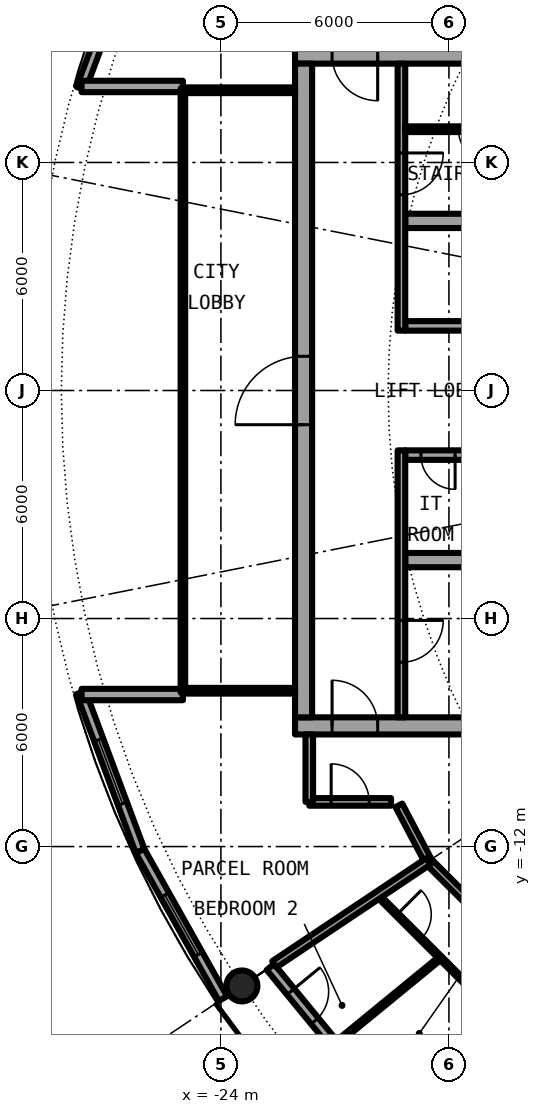
"""IFC4 building model, lengths in metres.
Left out: names, types, materials, properties, quantities, classifications, styles, units other than length and angle.
Written with IfcOpenShell. Run it as: python <this file> out.ifc"""

import sys

from ifc_helpers import new_model, si_unit, direction, frame, frame_2d, origin, origin_2d, place, context, subcontext, project, spatial, rectangle, hollow_circle, extrude, element, fill, save


model = new_model("IFC4")
c1 = context("Model", 3, precision=1e-05, world=origin(), true_north=direction((0.0, 1.0)))
c2 = subcontext(c1, "Body", "Model", "MODEL_VIEW")
j1 = project(units=[si_unit("LENGTHUNIT", "METRE"), si_unit("PLANEANGLEUNIT", "RADIAN")], contexts=[c1])
p1 = place(None, origin())
s1 = spatial("IfcSite", under=j1, at=p1, CompositionType="ELEMENT")
p2 = place(p1, origin())
s2 = spatial("IfcBuilding", under=s1, at=p2, CompositionType="ELEMENT")
p3 = place(p2, frame((0.0, 0.0, 212.7)))
s3 = spatial("IfcBuildingStorey", under=s2, at=p3, CompositionType="ELEMENT", Elevation=212.7)
p4 = place(p3, frame((-23.448, -15.667, 0.0), z_axis=(0.0, 0.0, 1.0), x_axis=(1.0, 0.0, 0.0)))
e1 = element("IfcColumn", 1, at=p4, inside=s3, PredefinedType="COLUMN", context=c2, shape_type="SweptSolid", body=[
    extrude(hollow_circle(Radius=0.406, WallThickness=0.03, at=origin_2d()), origin(), (0.0, 0.0, 1.0), 3.05),
])
p5 = place(p3, frame((-22.699, -15.167, 0.0), z_axis=(0.0, 0.0, 1.0), x_axis=(0.634382322723, -0.773019449054, 0.0)))
e2 = element("IfcWall", 2, at=p5, inside=s3, PredefinedType="SOLIDWALL", context=c2, shape_type="SweptSolid", body=[
    extrude(rectangle(XDim=5.352, YDim=0.25, at=frame_2d((2.676, 0.0))), origin(), (0.0, 0.0, 1.0), 2.7),
])
p6 = place(p5, frame((0.841, 0.0, 0.0)))
e3 = element("IfcOpeningElement", 3, at=p6, cuts=e2, PredefinedType="OPENING", context=c2, shape_type="SweptSolid", body=[
    extrude(rectangle(XDim=1.0, YDim=2.2, at=frame_2d((0.5, 1.1))), frame((0.0, 0.135, 0.0), z_axis=(0.0, -1.0, 0.0), x_axis=(1.0, 0.0, 0.0)), (0.0, 0.0, 1.0), 0.27),
])
p7 = place(p5, frame((3.111, 0.0, 0.3)))
e4 = element("IfcOpeningElement", 4, at=p7, cuts=e2, PredefinedType="OPENING", context=c2, shape_type="SweptSolid", body=[
    extrude(rectangle(XDim=1.8, YDim=2.1, at=frame_2d((0.9, 1.05))), frame((0.0, 0.135, 0.0), z_axis=(0.0, -1.0, 0.0), x_axis=(1.0, 0.0, 0.0)), (0.0, 0.0, 1.0), 0.27),
])
p8 = place(p3, frame((-27.682, -7.945, 0.0), z_axis=(0.0, 0.0, 1.0), x_axis=(0.349247811493, -0.937030397675, 0.0)))
e5 = element("IfcWall", 5, at=p8, inside=s3, PredefinedType="SOLIDWALL", context=c2, shape_type="SweptSolid", body=[
    extrude(rectangle(XDim=4.452, YDim=0.25, at=frame_2d((2.226, 0.0))), origin(), (0.0, 0.0, 1.0), 2.7),
])
p9 = place(p8, frame((1.327, 0.0, 0.3)))
e6 = element("IfcOpeningElement", 6, at=p9, cuts=e5, PredefinedType="OPENING", context=c2, shape_type="SweptSolid", body=[
    extrude(rectangle(XDim=1.8, YDim=2.1, at=frame_2d((0.9, 1.05))), frame((0.0, 0.135, 0.0), z_axis=(0.0, -1.0, 0.0), x_axis=(1.0, 0.0, 0.0)), (0.0, 0.0, 1.0), 0.27),
])
p10 = place(p3, frame((-26.127, -12.117, 0.0), z_axis=(0.0, 0.0, 1.0), x_axis=(0.489696356642, -0.871893042919, 0.0)))
e7 = element("IfcWall", 7, at=p10, inside=s3, PredefinedType="SOLIDWALL", context=c2, shape_type="SweptSolid", body=[
    extrude(rectangle(XDim=4.454, YDim=0.25, at=frame_2d((2.227, 0.0))), origin(), (0.0, 0.0, 1.0), 2.7),
])
p11 = place(p10, frame((1.327, 0.0, 0.3)))
e8 = element("IfcOpeningElement", 8, at=p11, cuts=e7, PredefinedType="OPENING", context=c2, shape_type="SweptSolid", body=[
    extrude(rectangle(XDim=1.8, YDim=2.1, at=frame_2d((0.9, 1.05))), frame((0.0, 0.135, 0.0), z_axis=(0.0, -1.0, 0.0), x_axis=(1.0, 0.0, 0.0)), (0.0, 0.0, 1.0), 0.27),
])
p12 = place(p3, frame((-26.127, 12.117, 0.0), z_axis=(0.0, 0.0, 1.0), x_axis=(-0.349247811493, -0.937030397675, 0.0)))
e9 = element("IfcWall", 9, at=p12, inside=s3, PredefinedType="SOLIDWALL", context=c2, shape_type="SweptSolid", body=[
    extrude(rectangle(XDim=4.452, YDim=0.25, at=frame_2d((2.226, 0.0))), origin(), (0.0, 0.0, 1.0), 2.7),
])
p13 = place(p12, frame((1.327, 0.0, 0.3)))
e10 = element("IfcOpeningElement", 10, at=p13, cuts=e9, PredefinedType="OPENING", context=c2, shape_type="SweptSolid", body=[
    extrude(rectangle(XDim=1.8, YDim=2.1, at=frame_2d((0.9, 1.05))), frame((0.0, 0.135, 0.0), z_axis=(0.0, -1.0, 0.0), x_axis=(1.0, 0.0, 0.0)), (0.0, 0.0, 1.0), 0.27),
])
for number, where, z_axis, x_axis in (
    (11, (-25.0, 8.0, 0.0), (0.0, 0.0, 1.0), (-1.0, 0.0, 0.0)),
    (12, (-25.0, -8.0, 0.0), (0.0, 0.0, 1.0), (-1.0, 0.0, 0.0)),
):
    element("IfcWall", number, at=place(p3, frame(where, z_axis=z_axis, x_axis=x_axis)), inside=s3, PredefinedType="SOLIDWALL", context=c2, shape_type="SweptSolid", body=[
        extrude(rectangle(XDim=2.667, YDim=0.3, at=frame_2d((1.333, 0.0))), origin(), (0.0, 0.0, 1.0), 2.7),
    ])
p14 = place(p3, frame((-22.05, -8.825, 0.0), z_axis=(0.0, 0.0, 1.0), x_axis=(1.0, 0.0, 0.0)))
e13 = element("IfcWall", 13, at=p14, inside=s3, PredefinedType="SHEAR", context=c2, shape_type="SweptSolid", body=[
    extrude(rectangle(XDim=13.5, YDim=0.45, at=frame_2d((6.75, 0.0))), origin(), (0.0, 0.0, 1.0), 3.05),
])
p15 = place(p14, frame((0.975, 0.0, 0.0)))
e14 = element("IfcOpeningElement", 14, at=p15, cuts=e13, PredefinedType="OPENING", context=c2, shape_type="SweptSolid", body=[
    extrude(rectangle(XDim=1.2, YDim=2.3, at=frame_2d((0.6, 1.15))), frame((0.0, 0.235, 0.0), z_axis=(0.0, -1.0, 0.0), x_axis=(1.0, 0.0, 0.0)), (0.0, 0.0, 1.0), 0.47),
])
p16 = place(p3, frame((-8.55, 8.825, 0.0), z_axis=(0.0, 0.0, 1.0), x_axis=(-1.0, 0.0, 0.0)))
e15 = element("IfcWall", 15, at=p16, inside=s3, PredefinedType="SHEAR", context=c2, shape_type="SweptSolid", body=[
    extrude(rectangle(XDim=13.5, YDim=0.45, at=frame_2d((6.75, 0.0))), origin(), (0.0, 0.0, 1.0), 3.05),
])
p17 = place(p16, frame((11.325, 0.0, 0.0)))
e16 = element("IfcOpeningElement", 16, at=p17, cuts=e15, PredefinedType="OPENING", context=c2, shape_type="SweptSolid", body=[
    extrude(rectangle(XDim=1.2, YDim=2.3, at=frame_2d((0.6, 1.15))), frame((0.0, 0.235, 0.0), z_axis=(0.0, -1.0, 0.0), x_axis=(1.0, 0.0, 0.0)), (0.0, 0.0, 1.0), 0.47),
])
p18 = place(p3, frame((-21.825, -8.6, 0.0), z_axis=(0.0, 0.0, 1.0), x_axis=(0.0, 1.0, 0.0)))
e17 = element("IfcWall", 17, at=p18, inside=s3, PredefinedType="SHEAR", context=c2, shape_type="SweptSolid", body=[
    extrude(rectangle(XDim=17.2, YDim=0.45, at=frame_2d((8.6, 0.0))), origin(), (0.0, 0.0, 1.0), 3.05),
])
p19 = place(p18, frame((7.7, 0.0, 0.0)))
e18 = element("IfcOpeningElement", 18, at=p19, cuts=e17, PredefinedType="OPENING", context=c2, shape_type="SweptSolid", body=[
    extrude(rectangle(XDim=1.8, YDim=2.3, at=frame_2d((0.9, 1.15))), frame((0.0, 0.235, 0.0), z_axis=(0.0, -1.0, 0.0), x_axis=(1.0, 0.0, 0.0)), (0.0, 0.0, 1.0), 0.47),
])
p20 = place(p3, frame((-9.0, -1.7, 0.0), z_axis=(0.0, 0.0, 1.0), x_axis=(-1.0, 0.0, 0.0)))
e19 = element("IfcWall", 19, at=p20, inside=s3, PredefinedType="SHEAR", context=c2, shape_type="SweptSolid", body=[
    extrude(rectangle(XDim=10.15, YDim=0.25, at=frame_2d((5.075, 0.0))), origin(), (0.0, 0.0, 1.0), 3.05),
])
p21 = place(p20, frame((0.762, 0.0, 0.0)))
e20 = element("IfcOpeningElement", 20, at=p21, cuts=e19, PredefinedType="OPENING", context=c2, shape_type="SweptSolid", body=[
    extrude(rectangle(XDim=0.9, YDim=2.3, at=frame_2d((0.45, 1.15))), frame((0.0, 0.135, 0.0), z_axis=(0.0, -1.0, 0.0), x_axis=(1.0, 0.0, 0.0)), (0.0, 0.0, 1.0), 0.27),
])
p22 = place(p20, frame((3.775, 0.0, 0.0)))
e21 = element("IfcOpeningElement", 21, at=p22, cuts=e19, PredefinedType="OPENING", context=c2, shape_type="SweptSolid", body=[
    extrude(rectangle(XDim=0.9, YDim=2.3, at=frame_2d((0.45, 1.15))), frame((0.0, 0.135, 0.0), z_axis=(0.0, -1.0, 0.0), x_axis=(1.0, 0.0, 0.0)), (0.0, 0.0, 1.0), 0.27),
])
p23 = place(p20, frame((8.837, 0.0, 0.0)))
e22 = element("IfcOpeningElement", 22, at=p23, cuts=e19, PredefinedType="OPENING", context=c2, shape_type="SweptSolid", body=[
    extrude(rectangle(XDim=0.9, YDim=2.3, at=frame_2d((0.45, 1.15))), frame((0.0, 0.135, 0.0), z_axis=(0.0, -1.0, 0.0), x_axis=(1.0, 0.0, 0.0)), (0.0, 0.0, 1.0), 0.27),
])
p24 = place(p3, frame((-9.0, -4.462, 0.0), z_axis=(0.0, 0.0, 1.0), x_axis=(-1.0, 0.0, 0.0)))
e23 = element("IfcWall", 23, at=p24, inside=s3, PredefinedType="SHEAR", context=c2, shape_type="SweptSolid", body=[
    extrude(rectangle(XDim=10.15, YDim=0.375, at=frame_2d((5.075, 0.0))), origin(), (0.0, 0.0, 1.0), 3.05),
])
p25 = place(p24, frame((6.6, 0.0, 0.0)))
e24 = element("IfcOpeningElement", 24, at=p25, cuts=e23, PredefinedType="OPENING", context=c2, shape_type="SweptSolid", body=[
    extrude(rectangle(XDim=1.1, YDim=2.3, at=frame_2d((0.55, 1.15))), frame((0.0, 0.198, 0.0), z_axis=(0.0, -1.0, 0.0), x_axis=(1.0, 0.0, 0.0)), (0.0, 0.0, 1.0), 0.395),
])
p26 = place(p3, frame((-19.25, -1.575, 0.0), z_axis=(0.0, 0.0, 1.0), x_axis=(0.0, -1.0, 0.0)))
e25 = element("IfcWall", 25, at=p26, inside=s3, PredefinedType="SOLIDWALL", context=c2, shape_type="SweptSolid", body=[
    extrude(rectangle(XDim=7.025, YDim=0.2, at=frame_2d((3.513, 0.0))), origin(), (0.0, 0.0, 1.0), 2.7),
])
p27 = place(p26, frame((4.475, 0.0, 0.0)))
e26 = element("IfcOpeningElement", 26, at=p27, cuts=e25, PredefinedType="OPENING", context=c2, shape_type="SweptSolid", body=[
    extrude(rectangle(XDim=1.1, YDim=2.3, at=frame_2d((0.55, 1.15))), frame((0.0, 0.11, 0.0), z_axis=(0.0, -1.0, 0.0), x_axis=(1.0, 0.0, 0.0)), (0.0, 0.0, 1.0), 0.22),
])
p28 = place(p3, frame((-9.0, 1.7, 0.0), z_axis=(0.0, 0.0, 1.0), x_axis=(-1.0, 0.0, 0.0)))
e27 = element("IfcWall", 27, at=p28, inside=s3, PredefinedType="SHEAR", context=c2, shape_type="SweptSolid", body=[
    extrude(rectangle(XDim=10.15, YDim=0.25, at=frame_2d((5.075, 0.0))), origin(), (0.0, 0.0, 1.0), 3.05),
])
p29 = place(p28, frame((0.387, 0.0, 0.0)))
e28 = element("IfcOpeningElement", 28, at=p29, cuts=e27, PredefinedType="OPENING", context=c2, shape_type="SweptSolid", body=[
    extrude(rectangle(XDim=1.1, YDim=2.3, at=frame_2d((0.55, 1.15))), frame((0.0, 0.135, 0.0), z_axis=(0.0, -1.0, 0.0), x_axis=(1.0, 0.0, 0.0)), (0.0, 0.0, 1.0), 0.27),
])
p30 = place(p28, frame((2.45, 0.0, 0.0)))
e29 = element("IfcOpeningElement", 29, at=p30, cuts=e27, PredefinedType="OPENING", context=c2, shape_type="SweptSolid", body=[
    extrude(rectangle(XDim=1.1, YDim=2.3, at=frame_2d((0.55, 1.15))), frame((0.0, 0.135, 0.0), z_axis=(0.0, -1.0, 0.0), x_axis=(1.0, 0.0, 0.0)), (0.0, 0.0, 1.0), 0.27),
])
p31 = place(p28, frame((4.45, 0.0, 0.0)))
e30 = element("IfcOpeningElement", 30, at=p31, cuts=e27, PredefinedType="OPENING", context=c2, shape_type="SweptSolid", body=[
    extrude(rectangle(XDim=1.1, YDim=2.3, at=frame_2d((0.55, 1.15))), frame((0.0, 0.135, 0.0), z_axis=(0.0, -1.0, 0.0), x_axis=(1.0, 0.0, 0.0)), (0.0, 0.0, 1.0), 0.27),
])
p32 = place(p28, frame((6.6, 0.0, 0.0)))
e31 = element("IfcOpeningElement", 31, at=p32, cuts=e27, PredefinedType="OPENING", context=c2, shape_type="SweptSolid", body=[
    extrude(rectangle(XDim=1.1, YDim=2.3, at=frame_2d((0.55, 1.15))), frame((0.0, 0.135, 0.0), z_axis=(0.0, -1.0, 0.0), x_axis=(1.0, 0.0, 0.0)), (0.0, 0.0, 1.0), 0.27),
])
p33 = place(p3, frame((-9.0, 4.462, 0.0), z_axis=(0.0, 0.0, 1.0), x_axis=(-1.0, 0.0, 0.0)))
e32 = element("IfcWall", 32, at=p33, inside=s3, PredefinedType="SHEAR", context=c2, shape_type="SweptSolid", body=[
    extrude(rectangle(XDim=10.15, YDim=0.375, at=frame_2d((5.075, 0.0))), origin(), (0.0, 0.0, 1.0), 3.05),
])
p34 = place(p3, frame((-19.25, 8.6, 0.0), z_axis=(0.0, 0.0, 1.0), x_axis=(0.0, -1.0, 0.0)))
e33 = element("IfcWall", 33, at=p34, inside=s3, PredefinedType="SOLIDWALL", context=c2, shape_type="SweptSolid", body=[
    extrude(rectangle(XDim=7.025, YDim=0.2, at=frame_2d((3.513, 0.0))), origin(), (0.0, 0.0, 1.0), 2.7),
])
p35 = place(p34, frame((2.35, 0.0, 0.0)))
e34 = element("IfcOpeningElement", 34, at=p35, cuts=e33, PredefinedType="OPENING", context=c2, shape_type="SweptSolid", body=[
    extrude(rectangle(XDim=1.1, YDim=2.3, at=frame_2d((0.55, 1.15))), frame((0.0, 0.11, 0.0), z_axis=(0.0, -1.0, 0.0), x_axis=(1.0, 0.0, 0.0)), (0.0, 0.0, 1.0), 0.22),
])
p36 = place(p3, frame((-15.45, 6.875, 0.0), z_axis=(0.0, 0.0, 1.0), x_axis=(-1.0, 0.0, 0.0)))
e35 = element("IfcWall", 35, at=p36, inside=s3, PredefinedType="PARTITIONING", context=c2, shape_type="SweptSolid", body=[
    extrude(rectangle(XDim=3.7, YDim=0.15, at=frame_2d((1.85, 0.0))), origin(), (0.0, 0.0, 1.0), 2.7),
])
p37 = place(p36, frame((1.4, 0.0, 0.0)))
e36 = element("IfcOpeningElement", 36, at=p37, cuts=e35, PredefinedType="OPENING", context=c2, shape_type="SweptSolid", body=[
    extrude(rectangle(XDim=0.9, YDim=2.3, at=frame_2d((0.45, 1.15))), frame((0.0, 0.085, 0.0), z_axis=(0.0, -1.0, 0.0), x_axis=(1.0, 0.0, 0.0)), (0.0, 0.0, 1.0), 0.17),
])
for number, where, z_axis, x_axis in (
    (37, (-22.05, 7.9, 0.0), (0.0, 0.0, 1.0), (-1.0, 0.0, 0.0)),
    (38, (-22.05, -7.9, 0.0), (0.0, 0.0, 1.0), (-1.0, 0.0, 0.0)),
):
    element("IfcWall", number, at=place(p3, frame(where, z_axis=z_axis, x_axis=x_axis)), inside=s3, PredefinedType="PARTITIONING", context=c2, shape_type="SweptSolid", body=[
        extrude(rectangle(XDim=2.89, YDim=0.15, at=frame_2d((1.445, 0.0))), origin(), (0.0, 0.0, 1.0), 2.7),
    ])
p38 = place(p3, frame((-25.0, 7.95, 0.0), z_axis=(0.0, 0.0, 1.0), x_axis=(0.0, -1.0, 0.0)))
e39 = element("IfcWall", 39, at=p38, inside=s3, PredefinedType="PARTITIONING", context=c2, shape_type="SweptSolid", body=[
    extrude(rectangle(XDim=15.9, YDim=0.12, at=frame_2d((7.95, 0.0))), origin(), (0.0, 0.0, 1.0), 2.7),
])
p39 = place(p38, frame((0.95, 0.0, 0.1)))
e40 = element("IfcOpeningElement", 40, at=p39, cuts=e39, PredefinedType="OPENING", context=c2, shape_type="SweptSolid", body=[
    extrude(rectangle(XDim=14.0, YDim=2.35, at=frame_2d((7.0, 1.175))), frame((0.0, 0.07, 0.0), z_axis=(0.0, -1.0, 0.0), x_axis=(1.0, 0.0, 0.0)), (0.0, 0.0, 1.0), 0.14),
])
p40 = place(p3, frame((-19.869, -13.285, 0.0), z_axis=(0.0, 0.0, 1.0), x_axis=(0.707290020325, -0.706923494552, 0.0)))
e41 = element("IfcWall", 41, at=p40, inside=s3, PredefinedType="PARTITIONING", context=c2, shape_type="SweptSolid", body=[
    extrude(rectangle(XDim=4.663, YDim=0.1, at=frame_2d((2.331, 0.0))), origin(), (0.0, 0.0, 1.0), 2.7),
])
p41 = place(p40, frame((0.712, 0.0, 0.0)))
e42 = element("IfcOpeningElement", 42, at=p41, cuts=e41, PredefinedType="OPENING", context=c2, shape_type="SweptSolid", body=[
    extrude(rectangle(XDim=0.9, YDim=2.3, at=frame_2d((0.45, 1.15))), frame((0.0, 0.06, 0.0), z_axis=(0.0, -1.0, 0.0), x_axis=(1.0, 0.0, 0.0)), (0.0, 0.0, 1.0), 0.12),
])
p42 = place(p3, frame((-19.317, -10.915, 0.0), z_axis=(0.0, 0.0, 1.0), x_axis=(0.465359652486, -0.885121683068, 0.0)))
e43 = element("IfcWall", 43, at=p42, inside=s3, PredefinedType="PARTITIONING", context=c2, shape_type="SweptSolid", body=[
    extrude(rectangle(XDim=1.665, YDim=0.2, at=frame_2d((0.833, 0.0))), origin(), (0.0, 0.0, 1.0), 2.7),
])
p43 = place(p3, frame((-18.542, -12.389, 0.0), z_axis=(0.0, 0.0, 1.0), x_axis=(0.707106781187, -0.707106781187, 0.0)))
e44 = element("IfcWall", 44, at=p43, inside=s3, PredefinedType="PARTITIONING", context=c2, shape_type="SweptSolid", body=[
    extrude(rectangle(XDim=8.702, YDim=0.2, at=frame_2d((4.351, 0.0))), origin(), (0.0, 0.0, 1.0), 2.7),
])
p44 = place(p43, frame((2.763, 0.0, 0.0)))
e45 = element("IfcOpeningElement", 45, at=p44, cuts=e44, PredefinedType="OPENING", context=c2, shape_type="SweptSolid", body=[
    extrude(rectangle(XDim=1.0, YDim=2.3, at=frame_2d((0.5, 1.15))), frame((0.0, 0.11, 0.0), z_axis=(0.0, -1.0, 0.0), x_axis=(1.0, 0.0, 0.0)), (0.0, 0.0, 1.0), 0.22),
])
p45 = place(p3, frame((-21.675, -10.825, 0.0), z_axis=(0.0, 0.0, 1.0), x_axis=(1.0, 0.0, 0.0)))
e46 = element("IfcWall", 46, at=p45, inside=s3, PredefinedType="PARTITIONING", context=c2, shape_type="SweptSolid", body=[
    extrude(rectangle(XDim=2.152, YDim=0.2, at=frame_2d((1.076, 0.0))), origin(), (0.0, 0.0, 1.0), 2.7),
])
p46 = place(p45, frame((0.576, 0.0, 0.0)))
e47 = element("IfcOpeningElement", 47, at=p46, cuts=e46, PredefinedType="OPENING", context=c2, shape_type="SweptSolid", body=[
    extrude(rectangle(XDim=1.0, YDim=2.3, at=frame_2d((0.5, 1.15))), frame((0.0, 0.11, 0.0), z_axis=(0.0, -1.0, 0.0), x_axis=(1.0, 0.0, 0.0)), (0.0, 0.0, 1.0), 0.22),
])
p47 = place(p3, frame((-22.595, -15.098, 0.0), z_axis=(0.0, 0.0, 1.0), x_axis=(0.831387096605, 0.55569370664, 0.0)))
e48 = element("IfcWall", 48, at=p47, inside=s3, PredefinedType="PARTITIONING", context=c2, shape_type="SweptSolid", body=[
    extrude(rectangle(XDim=4.875, YDim=0.2, at=frame_2d((2.438, 0.0))), origin(), (0.0, 0.0, 1.0), 2.7),
])
p48 = place(p3, frame((-21.023, -17.22, 0.0), z_axis=(0.0, 0.0, 1.0), x_axis=(0.773548271597, 0.633737383709, 0.0)))
e49 = element("IfcWall", 49, at=p48, inside=s3, PredefinedType="PARTITIONING", context=c2, shape_type="SweptSolid", body=[
    extrude(rectangle(XDim=3.618, YDim=0.1, at=frame_2d((1.809, 0.0))), origin(), (0.0, 0.0, 1.0), 2.7),
])
p49 = place(p3, frame((-19.216, -19.216, 0.0), z_axis=(0.0, 0.0, 1.0), x_axis=(0.707106781187, 0.707106781187, 0.0)))
e50 = element("IfcWall", 50, at=p49, inside=s3, PredefinedType="PARTITIONING", context=c2, shape_type="SweptSolid", body=[
    extrude(rectangle(XDim=3.735, YDim=0.1, at=frame_2d((1.868, 0.0))), origin(), (0.0, 0.0, 1.0), 2.7),
])
p50 = place(p49, frame((1.417, 0.0, 0.0)))
e51 = element("IfcOpeningElement", 51, at=p50, cuts=e50, PredefinedType="OPENING", context=c2, shape_type="SweptSolid", body=[
    extrude(rectangle(XDim=0.9, YDim=2.3, at=frame_2d((0.45, 1.15))), frame((0.0, 0.06, 0.0), z_axis=(0.0, -1.0, 0.0), x_axis=(1.0, 0.0, 0.0)), (0.0, 0.0, 1.0), 0.12),
])
p51 = place(p3, frame((-21.675, -10.825, 0.0), z_axis=(0.0, 0.0, 1.0), x_axis=(0.0, 1.0, 0.0)))
e52 = element("IfcWall", 52, at=p51, inside=s3, PredefinedType="PARTITIONING", context=c2, shape_type="SweptSolid", body=[
    extrude(rectangle(XDim=1.775, YDim=0.2, at=frame_2d((0.887, 0.0))), origin(), (0.0, 0.0, 1.0), 2.7),
])
p52 = place(p6, origin())
e53 = element("IfcDoor", 53, at=p52, inside=s3, OperationType="SINGLE_SWING_LEFT", PredefinedType="DOOR", context=c2, shape_type="SweptSolid", body=[
    extrude(rectangle(XDim=1.0, YDim=2.2, at=frame_2d((0.5, 1.1))), frame((0.0, 0.025, 0.0), z_axis=(0.0, -1.0, 0.0), x_axis=(1.0, 0.0, 0.0)), (0.0, 0.0, 1.0), 0.05),
])
fill(e3, e53)
p53 = place(p9, origin())
e54 = element("IfcWindow", 54, at=p53, inside=s3, PartitioningType="SINGLE_PANEL", PredefinedType="WINDOW", context=c2, shape_type="SweptSolid", body=[
    extrude(rectangle(XDim=1.8, YDim=2.1, at=frame_2d((0.9, 1.05))), frame((0.0, 0.03, 0.0), z_axis=(0.0, -1.0, 0.0), x_axis=(1.0, 0.0, 0.0)), (0.0, 0.0, 1.0), 0.06),
])
fill(e6, e54)
p54 = place(p11, origin())
e55 = element("IfcWindow", 55, at=p54, inside=s3, PartitioningType="SINGLE_PANEL", PredefinedType="WINDOW", context=c2, shape_type="SweptSolid", body=[
    extrude(rectangle(XDim=1.8, YDim=2.1, at=frame_2d((0.9, 1.05))), frame((0.0, 0.03, 0.0), z_axis=(0.0, -1.0, 0.0), x_axis=(1.0, 0.0, 0.0)), (0.0, 0.0, 1.0), 0.06),
])
fill(e8, e55)
p55 = place(p23, origin())
e56 = element("IfcDoor", 56, at=p55, inside=s3, OperationType="SINGLE_SWING_LEFT", PredefinedType="DOOR", context=c2, shape_type="SweptSolid", body=[
    extrude(rectangle(XDim=0.9, YDim=2.3, at=frame_2d((0.45, 1.15))), frame((0.0, 0.025, 0.0), z_axis=(0.0, -1.0, 0.0), x_axis=(1.0, 0.0, 0.0)), (0.0, 0.0, 1.0), 0.05),
])
fill(e22, e56)
p56 = place(p37, origin())
e57 = element("IfcDoor", 57, at=p56, inside=s3, OperationType="SINGLE_SWING_LEFT", PredefinedType="DOOR", context=c2, shape_type="SweptSolid", body=[
    extrude(rectangle(XDim=0.9, YDim=2.3, at=frame_2d((0.45, 1.15))), frame((0.0, 0.025, 0.0), z_axis=(0.0, -1.0, 0.0), x_axis=(1.0, 0.0, 0.0)), (0.0, 0.0, 1.0), 0.05),
])
fill(e36, e57)
p57 = place(p27, origin())
e58 = element("IfcDoor", 58, at=p57, inside=s3, OperationType="SINGLE_SWING_LEFT", PredefinedType="DOOR", context=c2, shape_type="SweptSolid", body=[
    extrude(rectangle(XDim=1.1, YDim=2.3, at=frame_2d((0.55, 1.15))), frame((0.0, 0.025, 0.0), z_axis=(0.0, -1.0, 0.0), x_axis=(1.0, 0.0, 0.0)), (0.0, 0.0, 1.0), 0.05),
])
fill(e26, e58)
p58 = place(p35, origin())
e59 = element("IfcDoor", 59, at=p58, inside=s3, OperationType="SINGLE_SWING_RIGHT", PredefinedType="DOOR", context=c2, shape_type="SweptSolid", body=[
    extrude(rectangle(XDim=1.1, YDim=2.3, at=frame_2d((0.55, 1.15))), frame((0.0, 0.025, 0.0), z_axis=(0.0, -1.0, 0.0), x_axis=(1.0, 0.0, 0.0)), (0.0, 0.0, 1.0), 0.05),
])
fill(e34, e59)
p59 = place(p15, origin())
e60 = element("IfcDoor", 60, at=p59, inside=s3, OperationType="SINGLE_SWING_RIGHT", PredefinedType="DOOR", context=c2, shape_type="SweptSolid", body=[
    extrude(rectangle(XDim=1.2, YDim=2.3, at=frame_2d((0.6, 1.15))), frame((0.0, 0.025, 0.0), z_axis=(0.0, -1.0, 0.0), x_axis=(1.0, 0.0, 0.0)), (0.0, 0.0, 1.0), 0.05),
])
fill(e14, e60)
p60 = place(p17, origin())
e61 = element("IfcDoor", 61, at=p60, inside=s3, OperationType="SINGLE_SWING_LEFT", PredefinedType="DOOR", context=c2, shape_type="SweptSolid", body=[
    extrude(rectangle(XDim=1.2, YDim=2.3, at=frame_2d((0.6, 1.15))), frame((0.0, 0.025, 0.0), z_axis=(0.0, -1.0, 0.0), x_axis=(1.0, 0.0, 0.0)), (0.0, 0.0, 1.0), 0.05),
])
fill(e16, e61)
p61 = place(p19, origin())
e62 = element("IfcDoor", 62, at=p61, inside=s3, OperationType="SINGLE_SWING_LEFT", PredefinedType="DOOR", context=c2, shape_type="SweptSolid", body=[
    extrude(rectangle(XDim=1.8, YDim=2.3, at=frame_2d((0.9, 1.15))), frame((0.0, 0.025, 0.0), z_axis=(0.0, -1.0, 0.0), x_axis=(1.0, 0.0, 0.0)), (0.0, 0.0, 1.0), 0.05),
])
fill(e18, e62)
p62 = place(p39, origin())
e63 = element("IfcWindow", 63, at=p62, inside=s3, PartitioningType="SINGLE_PANEL", PredefinedType="WINDOW", context=c2, shape_type="SweptSolid", body=[
    extrude(rectangle(XDim=14.0, YDim=2.35, at=frame_2d((7.0, 1.175))), frame((0.0, 0.03, 0.0), z_axis=(0.0, -1.0, 0.0), x_axis=(1.0, 0.0, 0.0)), (0.0, 0.0, 1.0), 0.06),
])
fill(e40, e63)
p63 = place(p41, origin())
e64 = element("IfcDoor", 64, at=p63, inside=s3, OperationType="SINGLE_SWING_LEFT", PredefinedType="DOOR", context=c2, shape_type="SweptSolid", body=[
    extrude(rectangle(XDim=0.9, YDim=2.3, at=frame_2d((0.45, 1.15))), frame((0.0, 0.025, 0.0), z_axis=(0.0, -1.0, 0.0), x_axis=(1.0, 0.0, 0.0)), (0.0, 0.0, 1.0), 0.05),
])
fill(e42, e64)
p64 = place(p46, origin())
e65 = element("IfcDoor", 65, at=p64, inside=s3, OperationType="SINGLE_SWING_LEFT", PredefinedType="DOOR", context=c2, shape_type="SweptSolid", body=[
    extrude(rectangle(XDim=1.0, YDim=2.3, at=frame_2d((0.5, 1.15))), frame((0.0, 0.025, 0.0), z_axis=(0.0, -1.0, 0.0), x_axis=(1.0, 0.0, 0.0)), (0.0, 0.0, 1.0), 0.05),
])
fill(e47, e65)
save(model, sys.argv[1])
